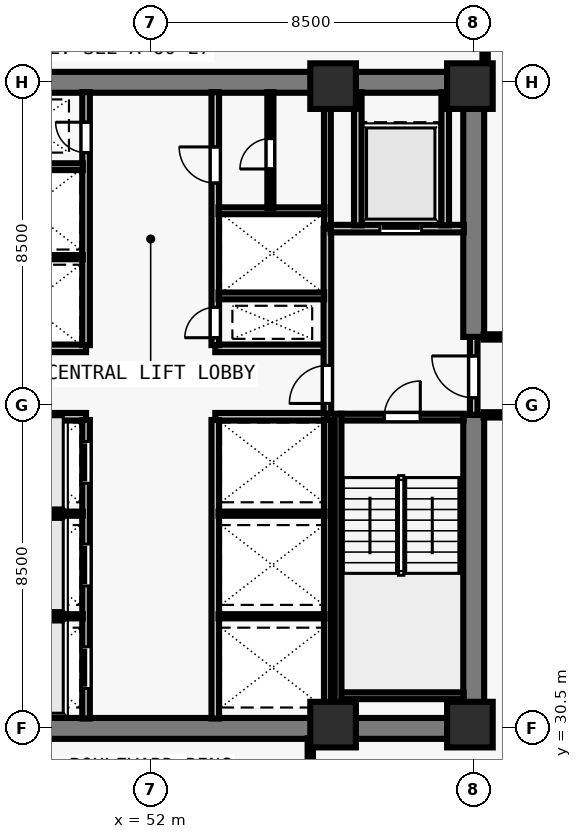
"""IFC4 building model, lengths in metres.
Left out: names, types, materials, properties, quantities, classifications, styles, units other than length and angle.
Written with IfcOpenShell. Run it as: python <this file> out.ifc"""

import sys

from ifc_helpers import new_model, si_unit, direction, frame, frame_2d, origin, origin_2d, place, context, subcontext, project, spatial, rectangle, extrude, element, fill, save


model = new_model("IFC4")
c1 = context("Model", 3, precision=1e-05, world=origin(), true_north=direction((0.0, 1.0)))
c2 = subcontext(c1, "Body", "Model", "MODEL_VIEW")
j1 = project(units=[si_unit("LENGTHUNIT", "METRE"), si_unit("PLANEANGLEUNIT", "RADIAN")], contexts=[c1])
p1 = place(None, origin())
s1 = spatial("IfcSite", under=j1, at=p1, CompositionType="ELEMENT")
p2 = place(p1, origin())
s2 = spatial("IfcBuilding", under=s1, at=p2, CompositionType="ELEMENT")
p3 = place(p2, frame((0.0, 0.0, 90.0)))
s3 = spatial("IfcBuildingStorey", under=s2, at=p3, CompositionType="ELEMENT", Elevation=90.0)
for number, where, z_axis, x_axis in (
    (1, (56.8, 30.6, 0.0), (0.0, 0.0, 1.0), (1.0, 0.0, 0.0)),
    (2, (60.4, 30.6, 0.0), (0.0, 0.0, 1.0), (1.0, 0.0, 0.0)),
    (3, (56.8, 47.4, 0.0), (0.0, 0.0, 1.0), (1.0, 0.0, 0.0)),
    (4, (60.4, 47.4, 0.0), (0.0, 0.0, 1.0), (1.0, 0.0, 0.0)),
):
    element("IfcColumn", number, at=place(p3, frame(where, z_axis=z_axis, x_axis=x_axis)), inside=s3, PredefinedType="COLUMN", context=c2, shape_type="SweptSolid", body=[
        extrude(rectangle(XDim=1.2, YDim=1.2, at=origin_2d()), origin(), (0.0, 0.0, 1.0), 3.5),
    ])
for number, where, z_axis, x_axis in (
    (5, (43.225, 30.5, 0.0), (0.0, 0.0, 1.0), (1.0, 0.0, 0.0)),
    (6, (43.225, 47.5, 0.0), (0.0, 0.0, 1.0), (1.0, 0.0, 0.0)),
):
    element("IfcWall", number, at=place(p3, frame(where, z_axis=z_axis, x_axis=x_axis)), inside=s3, PredefinedType="SHEAR", context=c2, shape_type="SweptSolid", body=[
        extrude(rectangle(XDim=17.55, YDim=0.55, at=frame_2d((8.775, 0.0))), origin(), (0.0, 0.0, 1.0), 3.28),
    ])
p4 = place(p3, frame((60.5, 30.765, 0.0), z_axis=(0.0, 0.0, 1.0), x_axis=(0.0, 1.0, 0.0)))
e7 = element("IfcWall", 7, at=p4, inside=s3, PredefinedType="SHEAR", context=c2, shape_type="SweptSolid", body=[
    extrude(rectangle(XDim=7.985, YDim=0.55, at=frame_2d((3.993, 0.0))), origin(), (0.0, 0.0, 1.0), 3.28),
])
p5 = place(p3, frame((60.5, 40.8, 0.0), z_axis=(0.0, 0.0, 1.0), x_axis=(0.0, 1.0, 0.0)))
e8 = element("IfcWall", 8, at=p5, inside=s3, PredefinedType="SHEAR", context=c2, shape_type="SweptSolid", body=[
    extrude(rectangle(XDim=6.435, YDim=0.55, at=frame_2d((3.218, 0.0))), origin(), (0.0, 0.0, 1.0), 3.28),
])
for number, where, z_axis, x_axis in (
    (9, (47.35, 38.7, 0.0), (0.0, 0.0, 1.0), (1.0, 0.0, 0.0)),
    (10, (47.35, 40.5, 0.0), (0.0, 0.0, 1.0), (1.0, 0.0, 0.0)),
    (11, (53.7, 38.7, 0.0), (0.0, 0.0, 1.0), (1.0, 0.0, 0.0)),
    (12, (53.7, 40.5, 0.0), (0.0, 0.0, 1.0), (1.0, 0.0, 0.0)),
):
    element("IfcWall", number, at=place(p3, frame(where, z_axis=z_axis, x_axis=x_axis)), inside=s3, PredefinedType="SOLIDWALL", context=c2, shape_type="SweptSolid", body=[
        extrude(rectangle(XDim=2.95, YDim=0.2, at=frame_2d((1.475, 0.0))), origin(), (0.0, 0.0, 1.0), 3.28),
    ])
p6 = place(p3, frame((50.3, 30.76, 0.0), z_axis=(0.0, 0.0, 1.0), x_axis=(0.0, 1.0, 0.0)))
e13 = element("IfcWall", 13, at=p6, inside=s3, PredefinedType="SOLIDWALL", context=c2, shape_type="SweptSolid", body=[
    extrude(rectangle(XDim=7.855, YDim=0.2, at=frame_2d((3.927, 0.0))), origin(), (0.0, 0.0, 1.0), 3.28),
])
p7 = place(p6, frame((0.79, 0.0, 0.0)))
e14 = element("IfcOpeningElement", 14, at=p7, cuts=e13, PredefinedType="OPENING", context=c2, shape_type="SweptSolid", body=[
    extrude(rectangle(XDim=1.1, YDim=2.2, at=frame_2d((0.55, 1.1))), frame((0.0, 0.11, 0.0), z_axis=(0.0, -1.0, 0.0), x_axis=(1.0, 0.0, 0.0)), (0.0, 0.0, 1.0), 0.22),
])
p8 = place(p6, frame((3.49, 0.0, 0.0)))
e15 = element("IfcOpeningElement", 15, at=p8, cuts=e13, PredefinedType="OPENING", context=c2, shape_type="SweptSolid", body=[
    extrude(rectangle(XDim=1.1, YDim=2.2, at=frame_2d((0.55, 1.1))), frame((0.0, 0.11, 0.0), z_axis=(0.0, -1.0, 0.0), x_axis=(1.0, 0.0, 0.0)), (0.0, 0.0, 1.0), 0.22),
])
p9 = place(p6, frame((6.19, 0.0, 0.0)))
e16 = element("IfcOpeningElement", 16, at=p9, cuts=e13, PredefinedType="OPENING", context=c2, shape_type="SweptSolid", body=[
    extrude(rectangle(XDim=1.1, YDim=2.2, at=frame_2d((0.55, 1.1))), frame((0.0, 0.11, 0.0), z_axis=(0.0, -1.0, 0.0), x_axis=(1.0, 0.0, 0.0)), (0.0, 0.0, 1.0), 0.22),
])
p10 = place(p3, frame((53.7, 30.76, 0.0), z_axis=(0.0, 0.0, 1.0), x_axis=(0.0, 1.0, 0.0)))
e17 = element("IfcWall", 17, at=p10, inside=s3, PredefinedType="SOLIDWALL", context=c2, shape_type="SweptSolid", body=[
    extrude(rectangle(XDim=7.855, YDim=0.2, at=frame_2d((3.927, 0.0))), origin(), (0.0, 0.0, 1.0), 3.28),
])
p11 = place(p3, frame((50.3, 40.585, 0.0), z_axis=(0.0, 0.0, 1.0), x_axis=(0.0, 1.0, 0.0)))
e18 = element("IfcWall", 18, at=p11, inside=s3, PredefinedType="SOLIDWALL", context=c2, shape_type="SweptSolid", body=[
    extrude(rectangle(XDim=6.655, YDim=0.2, at=frame_2d((3.328, 0.0))), origin(), (0.0, 0.0, 1.0), 3.28),
])
p12 = place(p11, frame((5.065, 0.0, 0.0)))
e19 = element("IfcOpeningElement", 19, at=p12, cuts=e18, PredefinedType="OPENING", context=c2, shape_type="SweptSolid", body=[
    extrude(rectangle(XDim=0.8, YDim=2.08, at=frame_2d((0.4, 1.04))), frame((0.0, 0.11, 0.0), z_axis=(0.0, -1.0, 0.0), x_axis=(1.0, 0.0, 0.0)), (0.0, 0.0, 1.0), 0.22),
])
p13 = place(p3, frame((53.7, 40.585, 0.0), z_axis=(0.0, 0.0, 1.0), x_axis=(0.0, 1.0, 0.0)))
e20 = element("IfcWall", 20, at=p13, inside=s3, PredefinedType="SOLIDWALL", context=c2, shape_type="SweptSolid", body=[
    extrude(rectangle(XDim=6.655, YDim=0.2, at=frame_2d((3.328, 0.0))), origin(), (0.0, 0.0, 1.0), 3.28),
])
p14 = place(p13, frame((0.195, 0.0, 0.0)))
e21 = element("IfcOpeningElement", 21, at=p14, cuts=e20, PredefinedType="OPENING", context=c2, shape_type="SweptSolid", body=[
    extrude(rectangle(XDim=0.8, YDim=2.08, at=frame_2d((0.4, 1.04))), frame((0.0, 0.11, 0.0), z_axis=(0.0, -1.0, 0.0), x_axis=(1.0, 0.0, 0.0)), (0.0, 0.0, 1.0), 0.22),
])
p15 = place(p13, frame((4.265, 0.0, 0.0)))
e22 = element("IfcOpeningElement", 22, at=p15, cuts=e20, PredefinedType="OPENING", context=c2, shape_type="SweptSolid", body=[
    extrude(rectangle(XDim=0.95, YDim=2.12, at=frame_2d((0.475, 1.06))), frame((0.0, 0.11, 0.0), z_axis=(0.0, -1.0, 0.0), x_axis=(1.0, 0.0, 0.0)), (0.0, 0.0, 1.0), 0.22),
])
p16 = place(p3, frame((60.5, 38.75, 0.0), z_axis=(0.0, 0.0, 1.0), x_axis=(0.0, 1.0, 0.0)))
e23 = element("IfcWall", 23, at=p16, inside=s3, PredefinedType="SOLIDWALL", context=c2, shape_type="SweptSolid", body=[
    extrude(rectangle(XDim=2.05, YDim=0.2, at=frame_2d((1.025, 0.0))), origin(), (0.0, 0.0, 1.0), 3.28),
])
p17 = place(p16, frame((0.45, 0.0, 0.0)))
e24 = element("IfcOpeningElement", 24, at=p17, cuts=e23, PredefinedType="OPENING", context=c2, shape_type="SweptSolid", body=[
    extrude(rectangle(XDim=1.1, YDim=2.15, at=frame_2d((0.55, 1.075))), frame((0.0, 0.11, 0.0), z_axis=(0.0, -1.0, 0.0), x_axis=(1.0, 0.0, 0.0)), (0.0, 0.0, 1.0), 0.22),
])
p18 = place(p3, frame((56.65, 38.785, 0.0), z_axis=(0.0, 0.0, 1.0), x_axis=(0.0, 1.0, 0.0)))
e25 = element("IfcWall", 25, at=p18, inside=s3, PredefinedType="SOLIDWALL", context=c2, shape_type="SweptSolid", body=[
    extrude(rectangle(XDim=4.865, YDim=0.2, at=frame_2d((2.433, 0.0))), origin(), (0.0, 0.0, 1.0), 3.28),
])
p19 = place(p18, frame((0.265, 0.0, 0.0)))
e26 = element("IfcOpeningElement", 26, at=p19, cuts=e25, PredefinedType="OPENING", context=c2, shape_type="SweptSolid", body=[
    extrude(rectangle(XDim=1.0, YDim=2.15, at=frame_2d((0.5, 1.075))), frame((0.0, 0.11, 0.0), z_axis=(0.0, -1.0, 0.0), x_axis=(1.0, 0.0, 0.0)), (0.0, 0.0, 1.0), 0.22),
])
p20 = place(p3, frame((56.735, 43.65, 0.0), z_axis=(0.0, 0.0, 1.0), x_axis=(1.0, 0.0, 0.0)))
e27 = element("IfcWall", 27, at=p20, inside=s3, PredefinedType="SOLIDWALL", context=c2, shape_type="SweptSolid", body=[
    extrude(rectangle(XDim=3.505, YDim=0.2, at=frame_2d((1.752, 0.0))), origin(), (0.0, 0.0, 1.0), 3.28),
])
p21 = place(p20, frame((1.295, 0.0, 0.0)))
e28 = element("IfcOpeningElement", 28, at=p21, cuts=e27, PredefinedType="OPENING", context=c2, shape_type="SweptSolid", body=[
    extrude(rectangle(XDim=1.1, YDim=2.2, at=frame_2d((0.55, 1.1))), frame((0.0, 0.11, 0.0), z_axis=(0.0, -1.0, 0.0), x_axis=(1.0, 0.0, 0.0)), (0.0, 0.0, 1.0), 0.22),
])
for number, where, z_axis, x_axis in (
    (29, (57.45, 43.735, 0.0), (0.0, 0.0, 1.0), (0.0, 1.0, 0.0)),
    (30, (59.75, 43.735, 0.0), (0.0, 0.0, 1.0), (0.0, 1.0, 0.0)),
):
    element("IfcWall", number, at=place(p3, frame(where, z_axis=z_axis, x_axis=x_axis)), inside=s3, PredefinedType="SOLIDWALL", context=c2, shape_type="SweptSolid", body=[
        extrude(rectangle(XDim=3.505, YDim=0.2, at=frame_2d((1.752, 0.0))), origin(), (0.0, 0.0, 1.0), 3.28),
    ])
for number, where, z_axis, x_axis in (
    (31, (47.425, 33.45, 0.0), (0.0, 0.0, 1.0), (1.0, 0.0, 0.0)),
    (32, (47.425, 36.15, 0.0), (0.0, 0.0, 1.0), (1.0, 0.0, 0.0)),
):
    element("IfcWall", number, at=place(p3, frame(where, z_axis=z_axis, x_axis=x_axis)), inside=s3, PredefinedType="PARTITIONING", context=c2, shape_type="SweptSolid", body=[
        extrude(rectangle(XDim=2.79, YDim=0.11, at=frame_2d((1.395, 0.0))), origin(), (0.0, 0.0, 1.0), 3.28),
    ])
p22 = place(p3, frame((56.65, 30.76, 0.0), z_axis=(0.0, 0.0, 1.0), x_axis=(0.0, 1.0, 0.0)))
e33 = element("IfcWall", 33, at=p22, inside=s3, PredefinedType="SOLIDWALL", context=c2, shape_type="SweptSolid", body=[
    extrude(rectangle(XDim=7.855, YDim=0.18, at=frame_2d((3.927, 0.0))), origin(), (0.0, 0.0, 1.0), 3.28),
])
for number, where, z_axis, x_axis in (
    (34, (53.785, 33.45, 0.0), (0.0, 0.0, 1.0), (1.0, 0.0, 0.0)),
    (35, (53.785, 36.15, 0.0), (0.0, 0.0, 1.0), (1.0, 0.0, 0.0)),
):
    element("IfcWall", number, at=place(p3, frame(where, z_axis=z_axis, x_axis=x_axis)), inside=s3, PredefinedType="PARTITIONING", context=c2, shape_type="SweptSolid", body=[
        extrude(rectangle(XDim=2.79, YDim=0.11, at=frame_2d((1.395, 0.0))), origin(), (0.0, 0.0, 1.0), 3.28),
    ])
p23 = place(p3, frame((47.435, 42.9, 0.0), z_axis=(0.0, 0.0, 1.0), x_axis=(1.0, 0.0, 0.0)))
e36 = element("IfcWall", 36, at=p23, inside=s3, PredefinedType="PARTITIONING", context=c2, shape_type="SweptSolid", body=[
    extrude(rectangle(XDim=2.78, YDim=0.11, at=frame_2d((1.39, 0.0))), origin(), (0.0, 0.0, 1.0), 3.28),
])
p24 = place(p3, frame((47.425, 45.28, 0.0), z_axis=(0.0, 0.0, 1.0), x_axis=(1.0, 0.0, 0.0)))
e37 = element("IfcWall", 37, at=p24, inside=s3, PredefinedType="SOLIDWALL", context=c2, shape_type="SweptSolid", body=[
    extrude(rectangle(XDim=2.79, YDim=0.18, at=frame_2d((1.395, 0.0))), origin(), (0.0, 0.0, 1.0), 3.28),
])
p25 = place(p3, frame((56.65, 43.735, 0.0), z_axis=(0.0, 0.0, 1.0), x_axis=(0.0, 1.0, 0.0)))
e38 = element("IfcWall", 38, at=p25, inside=s3, PredefinedType="SOLIDWALL", context=c2, shape_type="SweptSolid", body=[
    extrude(rectangle(XDim=3.505, YDim=0.18, at=frame_2d((1.752, 0.0))), origin(), (0.0, 0.0, 1.0), 3.28),
])
p26 = place(p3, frame((53.785, 41.88, 0.0), z_axis=(0.0, 0.0, 1.0), x_axis=(1.0, 0.0, 0.0)))
e39 = element("IfcWall", 39, at=p26, inside=s3, PredefinedType="SOLIDWALL", context=c2, shape_type="SweptSolid", body=[
    extrude(rectangle(XDim=2.78, YDim=0.18, at=frame_2d((1.39, 0.0))), origin(), (0.0, 0.0, 1.0), 3.28),
])
p27 = place(p3, frame((53.785, 44.12, 0.0), z_axis=(0.0, 0.0, 1.0), x_axis=(1.0, 0.0, 0.0)))
e40 = element("IfcWall", 40, at=p27, inside=s3, PredefinedType="SOLIDWALL", context=c2, shape_type="SweptSolid", body=[
    extrude(rectangle(XDim=2.79, YDim=0.18, at=frame_2d((1.395, 0.0))), origin(), (0.0, 0.0, 1.0), 3.28),
])
p28 = place(p3, frame((55.15, 44.195, 0.0), z_axis=(0.0, 0.0, 1.0), x_axis=(0.0, 1.0, 0.0)))
e41 = element("IfcWall", 41, at=p28, inside=s3, PredefinedType="PARTITIONING", context=c2, shape_type="SweptSolid", body=[
    extrude(rectangle(XDim=3.045, YDim=0.16, at=frame_2d((1.522, 0.0))), origin(), (0.0, 0.0, 1.0), 3.28),
])
p29 = place(p28, frame((1.025, 0.0, 0.0)))
e42 = element("IfcOpeningElement", 42, at=p29, cuts=e41, PredefinedType="OPENING", context=c2, shape_type="SweptSolid", body=[
    extrude(rectangle(XDim=0.8, YDim=2.1, at=frame_2d((0.4, 1.05))), frame((0.0, 0.09, 0.0), z_axis=(0.0, -1.0, 0.0), x_axis=(1.0, 0.0, 0.0)), (0.0, 0.0, 1.0), 0.18),
])
for number, where, z_axis, x_axis in (
    (43, (60.76, 38.75, 0.0), (0.0, 0.0, 1.0), (1.0, 0.0, 0.0)),
    (44, (60.76, 40.8, 0.0), (0.0, 0.0, 1.0), (1.0, 0.0, 0.0)),
):
    element("IfcWall", number, at=place(p3, frame(where, z_axis=z_axis, x_axis=x_axis)), inside=s3, PredefinedType="PARTITIONING", context=c2, shape_type="SweptSolid", body=[
        extrude(rectangle(XDim=3.585, YDim=0.14, at=frame_2d((1.792, 0.0))), origin(), (0.0, 0.0, 1.0), 3.28),
    ])
p30 = place(p3, frame((56.2, 26.505, 0.0), z_axis=(0.0, 0.0, 1.0), x_axis=(0.0, 1.0, 0.0)))
e45 = element("IfcWall", 45, at=p30, inside=s3, PredefinedType="PARTITIONING", context=c2, shape_type="SweptSolid", body=[
    extrude(rectangle(XDim=3.735, YDim=0.14, at=frame_2d((1.868, 0.0))), origin(), (0.0, 0.0, 1.0), 2.849),
])
p31 = place(p3, frame((60.8, 47.76, 0.0), z_axis=(0.0, 0.0, 1.0), x_axis=(0.0, 1.0, 0.0)))
e46 = element("IfcWall", 46, at=p31, inside=s3, PredefinedType="PARTITIONING", context=c2, shape_type="SweptSolid", body=[
    extrude(rectangle(XDim=3.735, YDim=0.14, at=frame_2d((1.868, 0.0))), origin(), (0.0, 0.0, 1.0), 2.439),
])
p32 = place(p3, frame((57.005, 38.69, 0.0), z_axis=(0.0, 0.0, 1.0), x_axis=(1.0, 0.0, 0.0)))
e47 = element("IfcWall", 47, at=p32, inside=s3, PredefinedType="SOLIDWALL", context=c2, shape_type="SweptSolid", body=[
    extrude(rectangle(XDim=3.23, YDim=0.18, at=frame_2d((1.615, 0.0))), origin(), (0.0, 0.0, 1.0), 3.28),
])
p33 = place(p32, frame((1.14, 0.0, 0.0)))
e48 = element("IfcOpeningElement", 48, at=p33, cuts=e47, PredefinedType="OPENING", context=c2, shape_type="SweptSolid", body=[
    extrude(rectangle(XDim=0.95, YDim=2.15, at=frame_2d((0.475, 1.075))), frame((0.0, 0.1, 0.0), z_axis=(0.0, -1.0, 0.0), x_axis=(1.0, 0.0, 0.0)), (0.0, 0.0, 1.0), 0.2),
])
p34 = place(p3, frame((57.005, 31.36, 0.0), z_axis=(0.0, 0.0, 1.0), x_axis=(1.0, 0.0, 0.0)))
e49 = element("IfcWall", 49, at=p34, inside=s3, PredefinedType="SOLIDWALL", context=c2, shape_type="SweptSolid", body=[
    extrude(rectangle(XDim=3.23, YDim=0.18, at=frame_2d((1.615, 0.0))), origin(), (0.0, 0.0, 1.0), 3.28),
])
p35 = place(p3, frame((56.93, 38.78, 0.0), z_axis=(0.0, 0.0, 1.0), x_axis=(0.0, -1.0, 0.0)))
e50 = element("IfcWall", 50, at=p35, inside=s3, PredefinedType="SOLIDWALL", context=c2, shape_type="SweptSolid", body=[
    extrude(rectangle(XDim=8.017, YDim=0.18, at=frame_2d((4.009, 0.0))), origin(), (0.0, 0.0, 1.0), 3.28),
])
p36 = place(p17, origin())
e51 = element("IfcDoor", 51, at=p36, inside=s3, OperationType="SINGLE_SWING_RIGHT", PredefinedType="DOOR", context=c2, shape_type="SweptSolid", body=[
    extrude(rectangle(XDim=1.1, YDim=2.15, at=frame_2d((0.55, 1.075))), frame((0.0, 0.025, 0.0), z_axis=(0.0, -1.0, 0.0), x_axis=(1.0, 0.0, 0.0)), (0.0, 0.0, 1.0), 0.05),
])
fill(e24, e51)
p37 = place(p19, origin())
e52 = element("IfcDoor", 52, at=p37, inside=s3, OperationType="SINGLE_SWING_LEFT", PredefinedType="DOOR", context=c2, shape_type="SweptSolid", body=[
    extrude(rectangle(XDim=1.0, YDim=2.15, at=frame_2d((0.5, 1.075))), frame((0.0, 0.025, 0.0), z_axis=(0.0, -1.0, 0.0), x_axis=(1.0, 0.0, 0.0)), (0.0, 0.0, 1.0), 0.05),
])
fill(e26, e52)
p38 = place(p21, origin())
e53 = element("IfcDoor", 53, at=p38, inside=s3, OperationType="SLIDING_TO_LEFT", PredefinedType="DOOR", context=c2, shape_type="SweptSolid", body=[
    extrude(rectangle(XDim=1.1, YDim=2.2, at=frame_2d((0.55, 1.1))), frame((0.0, 0.025, 0.0), z_axis=(0.0, -1.0, 0.0), x_axis=(1.0, 0.0, 0.0)), (0.0, 0.0, 1.0), 0.05),
])
fill(e28, e53)
p39 = place(p7, origin())
e54 = element("IfcDoor", 54, at=p39, inside=s3, OperationType="SLIDING_TO_LEFT", PredefinedType="DOOR", context=c2, shape_type="SweptSolid", body=[
    extrude(rectangle(XDim=1.1, YDim=2.2, at=frame_2d((0.55, 1.1))), frame((0.0, 0.025, 0.0), z_axis=(0.0, -1.0, 0.0), x_axis=(1.0, 0.0, 0.0)), (0.0, 0.0, 1.0), 0.05),
])
fill(e14, e54)
p40 = place(p8, origin())
e55 = element("IfcDoor", 55, at=p40, inside=s3, OperationType="SLIDING_TO_LEFT", PredefinedType="DOOR", context=c2, shape_type="SweptSolid", body=[
    extrude(rectangle(XDim=1.1, YDim=2.2, at=frame_2d((0.55, 1.1))), frame((0.0, 0.025, 0.0), z_axis=(0.0, -1.0, 0.0), x_axis=(1.0, 0.0, 0.0)), (0.0, 0.0, 1.0), 0.05),
])
fill(e15, e55)
p41 = place(p9, origin())
e56 = element("IfcDoor", 56, at=p41, inside=s3, OperationType="SLIDING_TO_LEFT", PredefinedType="DOOR", context=c2, shape_type="SweptSolid", body=[
    extrude(rectangle(XDim=1.1, YDim=2.2, at=frame_2d((0.55, 1.1))), frame((0.0, 0.025, 0.0), z_axis=(0.0, -1.0, 0.0), x_axis=(1.0, 0.0, 0.0)), (0.0, 0.0, 1.0), 0.05),
])
fill(e16, e56)
p42 = place(p12, origin())
e57 = element("IfcDoor", 57, at=p42, inside=s3, OperationType="SINGLE_SWING_RIGHT", PredefinedType="DOOR", context=c2, shape_type="SweptSolid", body=[
    extrude(rectangle(XDim=0.8, YDim=2.08, at=frame_2d((0.4, 1.04))), frame((0.0, 0.025, 0.0), z_axis=(0.0, -1.0, 0.0), x_axis=(1.0, 0.0, 0.0)), (0.0, 0.0, 1.0), 0.05),
])
fill(e19, e57)
p43 = place(p14, origin())
e58 = element("IfcDoor", 58, at=p43, inside=s3, OperationType="SINGLE_SWING_LEFT", PredefinedType="DOOR", context=c2, shape_type="SweptSolid", body=[
    extrude(rectangle(XDim=0.8, YDim=2.08, at=frame_2d((0.4, 1.04))), frame((0.0, 0.025, 0.0), z_axis=(0.0, -1.0, 0.0), x_axis=(1.0, 0.0, 0.0)), (0.0, 0.0, 1.0), 0.05),
])
fill(e21, e58)
p44 = place(p15, origin())
e59 = element("IfcDoor", 59, at=p44, inside=s3, OperationType="SINGLE_SWING_RIGHT", PredefinedType="DOOR", context=c2, shape_type="SweptSolid", body=[
    extrude(rectangle(XDim=0.95, YDim=2.12, at=frame_2d((0.475, 1.06))), frame((0.0, 0.025, 0.0), z_axis=(0.0, -1.0, 0.0), x_axis=(1.0, 0.0, 0.0)), (0.0, 0.0, 1.0), 0.05),
])
fill(e22, e59)
p45 = place(p29, origin())
e60 = element("IfcDoor", 60, at=p45, inside=s3, OperationType="SINGLE_SWING_LEFT", PredefinedType="DOOR", context=c2, shape_type="SweptSolid", body=[
    extrude(rectangle(XDim=0.8, YDim=2.1, at=frame_2d((0.4, 1.05))), frame((0.0, 0.025, 0.0), z_axis=(0.0, -1.0, 0.0), x_axis=(1.0, 0.0, 0.0)), (0.0, 0.0, 1.0), 0.05),
])
fill(e42, e60)
p46 = place(p33, origin())
e61 = element("IfcDoor", 61, at=p46, inside=s3, OperationType="SINGLE_SWING_RIGHT", PredefinedType="DOOR", context=c2, shape_type="SweptSolid", body=[
    extrude(rectangle(XDim=0.95, YDim=2.15, at=frame_2d((0.475, 1.075))), frame((0.0, 0.025, 0.0), z_axis=(0.0, -1.0, 0.0), x_axis=(1.0, 0.0, 0.0)), (0.0, 0.0, 1.0), 0.05),
])
fill(e48, e61)
save(model, sys.argv[1])
